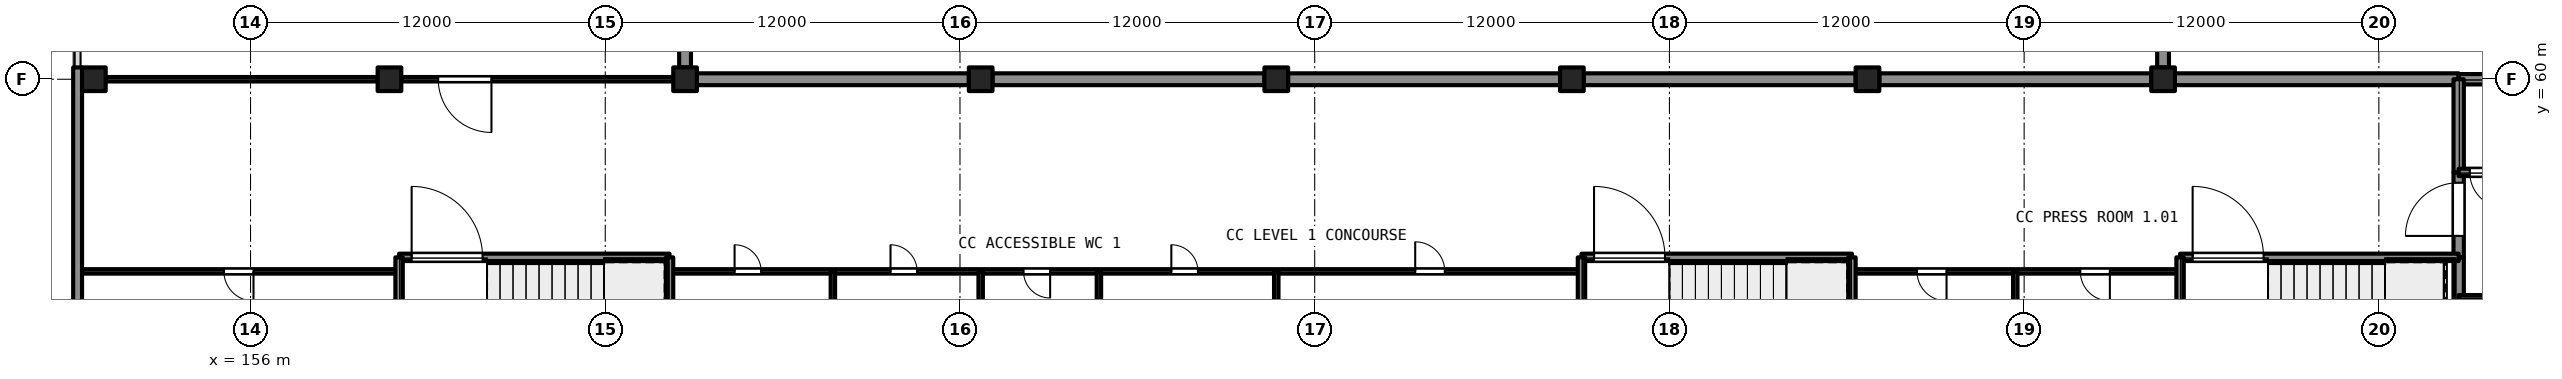
"""IFC4 building model, lengths in metres.
Left out: names, types, materials, properties, quantities, classifications, styles, units other than length and angle.
Written with IfcOpenShell. Run it as: python <this file> out.ifc"""

import sys

from ifc_helpers import new_model, si_unit, direction, frame, frame_2d, origin, origin_2d, place, context, subcontext, project, spatial, rectangle, extrude, element, fill, save


model = new_model("IFC4")
c1 = context("Model", 3, precision=1e-05, world=origin(), true_north=direction((0.0, 1.0)))
c2 = subcontext(c1, "Body", "Model", "MODEL_VIEW")
j1 = project(units=[si_unit("LENGTHUNIT", "METRE"), si_unit("PLANEANGLEUNIT", "RADIAN")], contexts=[c1])
p1 = place(None, origin())
s1 = spatial("IfcSite", under=j1, at=p1, CompositionType="ELEMENT")
p2 = place(p1, origin())
s2 = spatial("IfcBuilding", under=s1, at=p2, CompositionType="ELEMENT")
p3 = place(p2, frame((0.0, 0.0, 9.0)))
s3 = spatial("IfcBuildingStorey", under=s2, at=p3, CompositionType="ELEMENT", Elevation=9.0)
for number, where, z_axis, x_axis in (
    (1, (150.7, 60.0, 0.0), (0.0, 0.0, 1.0), (1.0, 0.0, 0.0)),
    (2, (160.7, 60.0, 0.0), (0.0, 0.0, 1.0), (1.0, 0.0, 0.0)),
    (3, (170.7, 60.0, 0.0), (0.0, 0.0, 1.0), (1.0, 0.0, 0.0)),
    (4, (180.7, 60.0, 0.0), (0.0, 0.0, 1.0), (1.0, 0.0, 0.0)),
    (5, (190.7, 60.0, 0.0), (0.0, 0.0, 1.0), (1.0, 0.0, 0.0)),
    (6, (200.7, 60.0, 0.0), (0.0, 0.0, 1.0), (1.0, 0.0, 0.0)),
    (7, (210.7, 60.0, 0.0), (0.0, 0.0, 1.0), (1.0, 0.0, 0.0)),
    (8, (220.7, 60.0, 0.0), (0.0, 0.0, 1.0), (1.0, 0.0, 0.0)),
):
    element("IfcColumn", number, at=place(p3, frame(where, z_axis=z_axis, x_axis=x_axis)), inside=s3, PredefinedType="COLUMN", context=c2, shape_type="SweptSolid", body=[
        extrude(rectangle(XDim=0.8, YDim=0.8, at=origin_2d()), origin(), (0.0, 0.0, 1.0), 6.0),
    ])
p4 = place(p3, frame((170.7, 60.4, 0.0), z_axis=(0.0, 0.0, 1.0), x_axis=(0.0, 1.0, 0.0)))
e9 = element("IfcWall", 9, at=p4, inside=s3, PredefinedType="SHEAR", context=c2, shape_type="SweptSolid", body=[
    extrude(rectangle(XDim=39.6, YDim=0.4, at=frame_2d((19.8, 0.0))), origin(), (0.0, 0.0, 1.0), 5.59),
])
for number, where, z_axis, x_axis in (
    (10, (171.1, 60.0, 0.0), (0.0, 0.0, 1.0), (1.0, 0.0, 0.0)),
    (11, (181.1, 60.0, 0.0), (0.0, 0.0, 1.0), (1.0, 0.0, 0.0)),
    (12, (191.1, 60.0, 0.0), (0.0, 0.0, 1.0), (1.0, 0.0, 0.0)),
    (13, (201.1, 60.0, 0.0), (0.0, 0.0, 1.0), (1.0, 0.0, 0.0)),
    (14, (211.1, 60.0, 0.0), (0.0, 0.0, 1.0), (1.0, 0.0, 0.0)),
):
    element("IfcWall", number, at=place(p3, frame(where, z_axis=z_axis, x_axis=x_axis)), inside=s3, PredefinedType="SHEAR", context=c2, shape_type="SweptSolid", body=[
        extrude(rectangle(XDim=9.2, YDim=0.4, at=frame_2d((4.6, 0.0))), origin(), (0.0, 0.0, 1.0), 5.59),
    ])
p5 = place(p3, frame((220.7, 60.4, 0.0), z_axis=(0.0, 0.0, 1.0), x_axis=(0.0, 1.0, 0.0)))
e15 = element("IfcWall", 15, at=p5, inside=s3, PredefinedType="SHEAR", context=c2, shape_type="SweptSolid", body=[
    extrude(rectangle(XDim=9.2, YDim=0.4, at=frame_2d((4.6, 0.0))), origin(), (0.0, 0.0, 1.0), 6.0),
])
p6 = place(p3, frame((221.1, 60.0, 0.0), z_axis=(0.0, 0.0, 1.0), x_axis=(1.0, 0.0, 0.0)))
e16 = element("IfcWall", 16, at=p6, inside=s3, PredefinedType="SHEAR", context=c2, shape_type="SweptSolid", body=[
    extrude(rectangle(XDim=9.6, YDim=0.4, at=frame_2d((4.8, 0.0))), origin(), (0.0, 0.0, 1.0), 6.0),
])
p7 = place(p3, frame((230.7, 60.0, 0.0), z_axis=(0.0, 0.0, 1.0), x_axis=(1.0, 0.0, 0.0)))
e17 = element("IfcWall", 17, at=p7, inside=s3, PredefinedType="SHEAR", context=c2, shape_type="SweptSolid", body=[
    extrude(rectangle(XDim=7.7, YDim=0.35, at=frame_2d((3.85, 0.0))), origin(), (0.0, 0.0, 1.0), 5.59),
])
p8 = place(p3, frame((230.7, 49.6, 0.0), z_axis=(0.0, 0.0, 1.0), x_axis=(0.0, 1.0, 0.0)))
e18 = element("IfcWall", 18, at=p8, inside=s3, PredefinedType="SHEAR", context=c2, shape_type="SweptSolid", body=[
    extrude(rectangle(XDim=4.375, YDim=0.35, at=frame_2d((2.188, 0.0))), origin(), (0.0, 0.0, 1.0), 5.59),
])
p9 = place(p3, frame((230.7, 53.975, 0.0), z_axis=(0.0, 0.0, 1.0), x_axis=(0.0, 1.0, 0.0)))
e19 = element("IfcWall", 19, at=p9, inside=s3, PredefinedType="SHEAR", context=c2, shape_type="SweptSolid", body=[
    extrude(rectangle(XDim=2.875, YDim=0.35, at=frame_2d((1.438, 0.0))), origin(), (0.0, 0.0, 1.0), 5.59),
])
p10 = place(p9, frame((0.725, 0.0, 0.0)))
e20 = element("IfcOpeningElement", 20, at=p10, cuts=e19, PredefinedType="OPENING", context=c2, shape_type="SweptSolid", body=[
    extrude(rectangle(XDim=1.8, YDim=2.1, at=frame_2d((0.9, 1.05))), frame((0.0, 0.186, 0.0), z_axis=(0.0, -1.0, 0.0), x_axis=(1.0, 0.0, 0.0)), (0.0, 0.0, 1.0), 0.371),
])
p11 = place(p3, frame((230.7, 56.85, 0.0), z_axis=(0.0, 0.0, 1.0), x_axis=(0.0, 1.0, 0.0)))
e21 = element("IfcWall", 21, at=p11, inside=s3, PredefinedType="SHEAR", context=c2, shape_type="SweptSolid", body=[
    extrude(rectangle(XDim=3.15, YDim=0.35, at=frame_2d((1.575, 0.0))), origin(), (0.0, 0.0, 1.0), 5.59),
])
p12 = place(p3, frame((238.4, 56.85, 0.0), z_axis=(0.0, 0.0, 1.0), x_axis=(-1.0, 0.0, 0.0)))
e22 = element("IfcWall", 22, at=p12, inside=s3, PredefinedType="SHEAR", context=c2, shape_type="SweptSolid", body=[
    extrude(rectangle(XDim=7.7, YDim=0.25, at=frame_2d((3.85, 0.0))), origin(), (0.0, 0.0, 1.0), 5.59),
])
p13 = place(p12, frame((6.125, 0.0, 0.0)))
e23 = element("IfcOpeningElement", 23, at=p13, cuts=e22, PredefinedType="OPENING", context=c2, shape_type="SweptSolid", body=[
    extrude(rectangle(XDim=1.2, YDim=2.1, at=frame_2d((0.6, 1.05))), frame((0.0, 0.135, 0.0), z_axis=(0.0, -1.0, 0.0), x_axis=(1.0, 0.0, 0.0)), (0.0, 0.0, 1.0), 0.271),
])
p14 = place(p3, frame((237.525, 52.625, 0.0), z_axis=(0.0, 0.0, 1.0), x_axis=(-1.0, 0.0, 0.0)))
e24 = element("IfcWall", 24, at=p14, inside=s3, PredefinedType="PARTITIONING", context=c2, shape_type="SweptSolid", body=[
    extrude(rectangle(XDim=6.825, YDim=0.15, at=frame_2d((3.413, 0.0))), origin(), (0.0, 0.0, 1.0), 5.59),
])
p15 = place(p14, frame((2.975, 0.0, 0.0)))
e25 = element("IfcOpeningElement", 25, at=p15, cuts=e24, PredefinedType="OPENING", context=c2, shape_type="SweptSolid", body=[
    extrude(rectangle(XDim=0.9, YDim=2.1, at=frame_2d((0.45, 1.05))), frame((0.0, 0.085, 0.0), z_axis=(0.0, -1.0, 0.0), x_axis=(1.0, 0.0, 0.0)), (0.0, 0.0, 1.0), 0.171),
])
p16 = place(p3, frame((150.15, 49.45, 0.0), z_axis=(0.0, 0.0, 1.0), x_axis=(0.0, 1.0, 0.0)))
e26 = element("IfcWall", 26, at=p16, inside=s3, PredefinedType="SOLIDWALL", context=c2, shape_type="SweptSolid", body=[
    extrude(rectangle(XDim=10.95, YDim=0.3, at=frame_2d((5.475, 0.0))), origin(), (0.0, 0.0, 1.0), 5.59),
])
p17 = place(p3, frame((151.1, 60.0, 0.0), z_axis=(0.0, 0.0, 1.0), x_axis=(1.0, 0.0, 0.0)))
e27 = element("IfcWall", 27, at=p17, inside=s3, PredefinedType="PARTITIONING", context=c2, shape_type="SweptSolid", body=[
    extrude(rectangle(XDim=9.2, YDim=0.15, at=frame_2d((4.6, 0.0))), origin(), (0.0, 0.0, 1.0), 5.59),
])
p18 = place(p3, frame((170.3, 60.0, 0.0), z_axis=(0.0, 0.0, 1.0), x_axis=(-1.0, 0.0, 0.0)))
e28 = element("IfcWall", 28, at=p18, inside=s3, PredefinedType="PARTITIONING", context=c2, shape_type="SweptSolid", body=[
    extrude(rectangle(XDim=9.2, YDim=0.15, at=frame_2d((4.6, 0.0))), origin(), (0.0, 0.0, 1.0), 5.59),
])
p19 = place(p18, frame((6.15, 0.0, 0.0)))
e29 = element("IfcOpeningElement", 29, at=p19, cuts=e28, PredefinedType="OPENING", context=c2, shape_type="SweptSolid", body=[
    extrude(rectangle(XDim=1.8, YDim=2.1, at=frame_2d((0.9, 1.05))), frame((0.0, 0.085, 0.0), z_axis=(0.0, -1.0, 0.0), x_axis=(1.0, 0.0, 0.0)), (0.0, 0.0, 1.0), 0.171),
])
p20 = place(p3, frame((150.3, 53.5, 0.0), z_axis=(0.0, 0.0, 1.0), x_axis=(1.0, 0.0, 0.0)))
e30 = element("IfcWall", 30, at=p20, inside=s3, PredefinedType="PARTITIONING", context=c2, shape_type="SweptSolid", body=[
    extrude(rectangle(XDim=10.725, YDim=0.15, at=frame_2d((5.362, 0.0))), origin(), (0.0, 0.0, 1.0), 5.59),
])
p21 = place(p20, frame((4.8, 0.0, 0.0)))
e31 = element("IfcOpeningElement", 31, at=p21, cuts=e30, PredefinedType="OPENING", context=c2, shape_type="SweptSolid", body=[
    extrude(rectangle(XDim=1.0, YDim=2.1, at=frame_2d((0.5, 1.05))), frame((0.0, 0.085, 0.0), z_axis=(0.0, -1.0, 0.0), x_axis=(1.0, 0.0, 0.0)), (0.0, 0.0, 1.0), 0.171),
])
p22 = place(p3, frame((170.175, 53.5, 0.0), z_axis=(0.0, 0.0, 1.0), x_axis=(1.0, 0.0, 0.0)))
e32 = element("IfcWall", 32, at=p22, inside=s3, PredefinedType="PARTITIONING", context=c2, shape_type="SweptSolid", body=[
    extrude(rectangle(XDim=30.85, YDim=0.15, at=frame_2d((15.425, 0.0))), origin(), (0.0, 0.0, 1.0), 5.59),
])
p23 = place(p22, frame((11.975, 0.0, 0.0)))
e33 = element("IfcOpeningElement", 33, at=p23, cuts=e32, PredefinedType="OPENING", context=c2, shape_type="SweptSolid", body=[
    extrude(rectangle(XDim=0.9, YDim=2.1, at=frame_2d((0.45, 1.05))), frame((0.0, 0.085, 0.0), z_axis=(0.0, -1.0, 0.0), x_axis=(1.0, 0.0, 0.0)), (0.0, 0.0, 1.0), 0.171),
])
p24 = place(p22, frame((16.975, 0.0, 0.0)))
e34 = element("IfcOpeningElement", 34, at=p24, cuts=e32, PredefinedType="OPENING", context=c2, shape_type="SweptSolid", body=[
    extrude(rectangle(XDim=0.9, YDim=2.1, at=frame_2d((0.45, 1.05))), frame((0.0, 0.085, 0.0), z_axis=(0.0, -1.0, 0.0), x_axis=(1.0, 0.0, 0.0)), (0.0, 0.0, 1.0), 0.171),
])
p25 = place(p22, frame((25.225, 0.0, 0.0)))
e35 = element("IfcOpeningElement", 35, at=p25, cuts=e32, PredefinedType="OPENING", context=c2, shape_type="SweptSolid", body=[
    extrude(rectangle(XDim=1.0, YDim=2.1, at=frame_2d((0.5, 1.05))), frame((0.0, 0.085, 0.0), z_axis=(0.0, -1.0, 0.0), x_axis=(1.0, 0.0, 0.0)), (0.0, 0.0, 1.0), 0.171),
])
p26 = place(p22, frame((7.475, 0.0, 0.0)))
e36 = element("IfcOpeningElement", 36, at=p26, cuts=e32, PredefinedType="OPENING", context=c2, shape_type="SweptSolid", body=[
    extrude(rectangle(XDim=0.9, YDim=2.1, at=frame_2d((0.45, 1.05))), frame((0.0, 0.085, 0.0), z_axis=(0.0, -1.0, 0.0), x_axis=(1.0, 0.0, 0.0)), (0.0, 0.0, 1.0), 0.171),
])
p27 = place(p22, frame((2.2, 0.0, 0.0)))
e37 = element("IfcOpeningElement", 37, at=p27, cuts=e32, PredefinedType="OPENING", context=c2, shape_type="SweptSolid", body=[
    extrude(rectangle(XDim=0.9, YDim=2.1, at=frame_2d((0.45, 1.05))), frame((0.0, 0.085, 0.0), z_axis=(0.0, -1.0, 0.0), x_axis=(1.0, 0.0, 0.0)), (0.0, 0.0, 1.0), 0.171),
])
p28 = place(p3, frame((210.175, 53.5, 0.0), z_axis=(0.0, 0.0, 1.0), x_axis=(1.0, 0.0, 0.0)))
e38 = element("IfcWall", 38, at=p28, inside=s3, PredefinedType="PARTITIONING", context=c2, shape_type="SweptSolid", body=[
    extrude(rectangle(XDim=11.1, YDim=0.15, at=frame_2d((5.55, 0.0))), origin(), (0.0, 0.0, 1.0), 5.59),
])
p29 = place(p28, frame((2.2, 0.0, 0.0)))
e39 = element("IfcOpeningElement", 39, at=p29, cuts=e38, PredefinedType="OPENING", context=c2, shape_type="SweptSolid", body=[
    extrude(rectangle(XDim=1.0, YDim=2.1, at=frame_2d((0.5, 1.05))), frame((0.0, 0.085, 0.0), z_axis=(0.0, -1.0, 0.0), x_axis=(1.0, 0.0, 0.0)), (0.0, 0.0, 1.0), 0.171),
])
p30 = place(p28, frame((7.725, 0.0, 0.0)))
e40 = element("IfcOpeningElement", 40, at=p30, cuts=e38, PredefinedType="OPENING", context=c2, shape_type="SweptSolid", body=[
    extrude(rectangle(XDim=1.0, YDim=2.1, at=frame_2d((0.5, 1.05))), frame((0.0, 0.085, 0.0), z_axis=(0.0, -1.0, 0.0), x_axis=(1.0, 0.0, 0.0)), (0.0, 0.0, 1.0), 0.171),
])
p31 = place(p3, frame((161.025, 53.975, 0.0), z_axis=(0.0, 0.0, 1.0), x_axis=(1.0, 0.0, 0.0)))
e41 = element("IfcWall", 41, at=p31, inside=s3, PredefinedType="SHEAR", context=c2, shape_type="SweptSolid", body=[
    extrude(rectangle(XDim=9.15, YDim=0.25, at=frame_2d((4.575, 0.0))), origin(), (0.0, 0.0, 1.0), 5.59),
])
p32 = place(p31, frame((0.425, 0.0, 0.0)))
e42 = element("IfcOpeningElement", 42, at=p32, cuts=e41, PredefinedType="OPENING", context=c2, shape_type="SweptSolid", body=[
    extrude(rectangle(XDim=2.4, YDim=2.1, at=frame_2d((1.2, 1.05))), frame((0.0, 0.135, 0.0), z_axis=(0.0, -1.0, 0.0), x_axis=(1.0, 0.0, 0.0)), (0.0, 0.0, 1.0), 0.271),
])
p33 = place(p3, frame((161.025, 50.4, 0.0), z_axis=(0.0, 0.0, 1.0), x_axis=(0.0, 1.0, 0.0)))
e43 = element("IfcWall", 43, at=p33, inside=s3, PredefinedType="SHEAR", context=c2, shape_type="SweptSolid", body=[
    extrude(rectangle(XDim=3.575, YDim=0.25, at=frame_2d((1.788, 0.0))), origin(), (0.0, 0.0, 1.0), 5.59),
])
p34 = place(p3, frame((170.175, 49.6, 0.0), z_axis=(0.0, 0.0, 1.0), x_axis=(0.0, 1.0, 0.0)))
e44 = element("IfcWall", 44, at=p34, inside=s3, PredefinedType="SHEAR", context=c2, shape_type="SweptSolid", body=[
    extrude(rectangle(XDim=4.375, YDim=0.25, at=frame_2d((2.188, 0.0))), origin(), (0.0, 0.0, 1.0), 5.59),
])
p35 = place(p3, frame((201.025, 53.975, 0.0), z_axis=(0.0, 0.0, 1.0), x_axis=(1.0, 0.0, 0.0)))
e45 = element("IfcWall", 45, at=p35, inside=s3, PredefinedType="SHEAR", context=c2, shape_type="SweptSolid", body=[
    extrude(rectangle(XDim=9.15, YDim=0.25, at=frame_2d((4.575, 0.0))), origin(), (0.0, 0.0, 1.0), 5.59),
])
p36 = place(p35, frame((0.425, 0.0, 0.0)))
e46 = element("IfcOpeningElement", 46, at=p36, cuts=e45, PredefinedType="OPENING", context=c2, shape_type="SweptSolid", body=[
    extrude(rectangle(XDim=2.4, YDim=2.1, at=frame_2d((1.2, 1.05))), frame((0.0, 0.135, 0.0), z_axis=(0.0, -1.0, 0.0), x_axis=(1.0, 0.0, 0.0)), (0.0, 0.0, 1.0), 0.271),
])
p37 = place(p3, frame((201.025, 50.4, 0.0), z_axis=(0.0, 0.0, 1.0), x_axis=(0.0, 1.0, 0.0)))
e47 = element("IfcWall", 47, at=p37, inside=s3, PredefinedType="SHEAR", context=c2, shape_type="SweptSolid", body=[
    extrude(rectangle(XDim=3.575, YDim=0.25, at=frame_2d((1.788, 0.0))), origin(), (0.0, 0.0, 1.0), 5.59),
])
p38 = place(p3, frame((210.175, 49.6, 0.0), z_axis=(0.0, 0.0, 1.0), x_axis=(0.0, 1.0, 0.0)))
e48 = element("IfcWall", 48, at=p38, inside=s3, PredefinedType="SHEAR", context=c2, shape_type="SweptSolid", body=[
    extrude(rectangle(XDim=4.375, YDim=0.25, at=frame_2d((2.188, 0.0))), origin(), (0.0, 0.0, 1.0), 5.59),
])
p39 = place(p3, frame((221.275, 53.975, 0.0), z_axis=(0.0, 0.0, 1.0), x_axis=(1.0, 0.0, 0.0)))
e49 = element("IfcWall", 49, at=p39, inside=s3, PredefinedType="SHEAR", context=c2, shape_type="SweptSolid", body=[
    extrude(rectangle(XDim=9.425, YDim=0.25, at=frame_2d((4.712, 0.0))), origin(), (0.0, 0.0, 1.0), 5.59),
])
p40 = place(p39, frame((0.425, 0.0, 0.0)))
e50 = element("IfcOpeningElement", 50, at=p40, cuts=e49, PredefinedType="OPENING", context=c2, shape_type="SweptSolid", body=[
    extrude(rectangle(XDim=2.4, YDim=2.1, at=frame_2d((1.2, 1.05))), frame((0.0, 0.135, 0.0), z_axis=(0.0, -1.0, 0.0), x_axis=(1.0, 0.0, 0.0)), (0.0, 0.0, 1.0), 0.271),
])
p41 = place(p3, frame((221.275, 49.6, 0.0), z_axis=(0.0, 0.0, 1.0), x_axis=(0.0, 1.0, 0.0)))
e51 = element("IfcWall", 51, at=p41, inside=s3, PredefinedType="SHEAR", context=c2, shape_type="SweptSolid", body=[
    extrude(rectangle(XDim=4.375, YDim=0.25, at=frame_2d((2.188, 0.0))), origin(), (0.0, 0.0, 1.0), 5.59),
])
p42 = place(p3, frame((175.7, 49.6, 0.0), z_axis=(0.0, 0.0, 1.0), x_axis=(0.0, 1.0, 0.0)))
e52 = element("IfcWall", 52, at=p42, inside=s3, PredefinedType="PARTITIONING", context=c2, shape_type="SweptSolid", body=[
    extrude(rectangle(XDim=3.9, YDim=0.15, at=frame_2d((1.95, 0.0))), origin(), (0.0, 0.0, 1.0), 5.59),
])
p43 = place(p3, frame((180.7, 50.4, 0.0), z_axis=(0.0, 0.0, 1.0), x_axis=(0.0, 1.0, 0.0)))
e53 = element("IfcWall", 53, at=p43, inside=s3, PredefinedType="PARTITIONING", context=c2, shape_type="SweptSolid", body=[
    extrude(rectangle(XDim=3.1, YDim=0.15, at=frame_2d((1.55, 0.0))), origin(), (0.0, 0.0, 1.0), 5.59),
])
p44 = place(p3, frame((184.7, 49.6, 0.0), z_axis=(0.0, 0.0, 1.0), x_axis=(0.0, 1.0, 0.0)))
e54 = element("IfcWall", 54, at=p44, inside=s3, PredefinedType="PARTITIONING", context=c2, shape_type="SweptSolid", body=[
    extrude(rectangle(XDim=3.9, YDim=0.15, at=frame_2d((1.95, 0.0))), origin(), (0.0, 0.0, 1.0), 5.59),
])
p45 = place(p3, frame((190.7, 50.4, 0.0), z_axis=(0.0, 0.0, 1.0), x_axis=(0.0, 1.0, 0.0)))
e55 = element("IfcWall", 55, at=p45, inside=s3, PredefinedType="PARTITIONING", context=c2, shape_type="SweptSolid", body=[
    extrude(rectangle(XDim=3.1, YDim=0.15, at=frame_2d((1.55, 0.0))), origin(), (0.0, 0.0, 1.0), 5.59),
])
p46 = place(p3, frame((215.7, 49.6, 0.0), z_axis=(0.0, 0.0, 1.0), x_axis=(0.0, 1.0, 0.0)))
e56 = element("IfcWall", 56, at=p46, inside=s3, PredefinedType="PARTITIONING", context=c2, shape_type="SweptSolid", body=[
    extrude(rectangle(XDim=3.9, YDim=0.15, at=frame_2d((1.95, 0.0))), origin(), (0.0, 0.0, 1.0), 5.59),
])
p47 = place(p23, origin())
e57 = element("IfcDoor", 57, at=p47, inside=s3, OperationType="SINGLE_SWING_RIGHT", PredefinedType="DOOR", context=c2, shape_type="SweptSolid", body=[
    extrude(rectangle(XDim=0.9, YDim=2.1, at=frame_2d((0.45, 1.05))), frame((0.0, 0.025, 0.0), z_axis=(0.0, -1.0, 0.0), x_axis=(1.0, 0.0, 0.0)), (0.0, 0.0, 1.0), 0.05),
])
fill(e33, e57)
p48 = place(p24, origin())
e58 = element("IfcDoor", 58, at=p48, inside=s3, OperationType="SINGLE_SWING_LEFT", PredefinedType="DOOR", context=c2, shape_type="SweptSolid", body=[
    extrude(rectangle(XDim=0.9, YDim=2.1, at=frame_2d((0.45, 1.05))), frame((0.0, 0.025, 0.0), z_axis=(0.0, -1.0, 0.0), x_axis=(1.0, 0.0, 0.0)), (0.0, 0.0, 1.0), 0.05),
])
fill(e34, e58)
p49 = place(p21, origin())
e59 = element("IfcDoor", 59, at=p49, inside=s3, OperationType="SINGLE_SWING_RIGHT", PredefinedType="DOOR", context=c2, shape_type="SweptSolid", body=[
    extrude(rectangle(XDim=1.0, YDim=2.1, at=frame_2d((0.5, 1.05))), frame((0.0, 0.025, 0.0), z_axis=(0.0, -1.0, 0.0), x_axis=(1.0, 0.0, 0.0)), (0.0, 0.0, 1.0), 0.05),
])
fill(e31, e59)
p50 = place(p25, origin())
e60 = element("IfcDoor", 60, at=p50, inside=s3, OperationType="SINGLE_SWING_LEFT", PredefinedType="DOOR", context=c2, shape_type="SweptSolid", body=[
    extrude(rectangle(XDim=1.0, YDim=2.1, at=frame_2d((0.5, 1.05))), frame((0.0, 0.025, 0.0), z_axis=(0.0, -1.0, 0.0), x_axis=(1.0, 0.0, 0.0)), (0.0, 0.0, 1.0), 0.05),
])
fill(e35, e60)
p51 = place(p29, origin())
e61 = element("IfcDoor", 61, at=p51, inside=s3, OperationType="SINGLE_SWING_RIGHT", PredefinedType="DOOR", context=c2, shape_type="SweptSolid", body=[
    extrude(rectangle(XDim=1.0, YDim=2.1, at=frame_2d((0.5, 1.05))), frame((0.0, 0.025, 0.0), z_axis=(0.0, -1.0, 0.0), x_axis=(1.0, 0.0, 0.0)), (0.0, 0.0, 1.0), 0.05),
])
fill(e39, e61)
p52 = place(p26, origin())
e62 = element("IfcDoor", 62, at=p52, inside=s3, OperationType="SINGLE_SWING_LEFT", PredefinedType="DOOR", context=c2, shape_type="SweptSolid", body=[
    extrude(rectangle(XDim=0.9, YDim=2.1, at=frame_2d((0.45, 1.05))), frame((0.0, 0.025, 0.0), z_axis=(0.0, -1.0, 0.0), x_axis=(1.0, 0.0, 0.0)), (0.0, 0.0, 1.0), 0.05),
])
fill(e36, e62)
p53 = place(p30, origin())
e63 = element("IfcDoor", 63, at=p53, inside=s3, OperationType="SINGLE_SWING_RIGHT", PredefinedType="DOOR", context=c2, shape_type="SweptSolid", body=[
    extrude(rectangle(XDim=1.0, YDim=2.1, at=frame_2d((0.5, 1.05))), frame((0.0, 0.025, 0.0), z_axis=(0.0, -1.0, 0.0), x_axis=(1.0, 0.0, 0.0)), (0.0, 0.0, 1.0), 0.05),
])
fill(e40, e63)
p54 = place(p27, origin())
e64 = element("IfcDoor", 64, at=p54, inside=s3, OperationType="SINGLE_SWING_LEFT", PredefinedType="DOOR", context=c2, shape_type="SweptSolid", body=[
    extrude(rectangle(XDim=0.9, YDim=2.1, at=frame_2d((0.45, 1.05))), frame((0.0, 0.025, 0.0), z_axis=(0.0, -1.0, 0.0), x_axis=(1.0, 0.0, 0.0)), (0.0, 0.0, 1.0), 0.05),
])
fill(e37, e64)
p55 = place(p19, origin())
e65 = element("IfcDoor", 65, at=p55, inside=s3, OperationType="DOUBLE_DOOR_SINGLE_SWING", PredefinedType="DOOR", context=c2, shape_type="SweptSolid", body=[
    extrude(rectangle(XDim=1.8, YDim=2.1, at=frame_2d((0.9, 1.05))), frame((0.0, 0.025, 0.0), z_axis=(0.0, -1.0, 0.0), x_axis=(1.0, 0.0, 0.0)), (0.0, 0.0, 1.0), 0.05),
])
fill(e29, e65)
p56 = place(p10, origin())
e66 = element("IfcDoor", 66, at=p56, inside=s3, OperationType="DOUBLE_DOOR_SINGLE_SWING", PredefinedType="DOOR", context=c2, shape_type="SweptSolid", body=[
    extrude(rectangle(XDim=1.8, YDim=2.1, at=frame_2d((0.9, 1.05))), frame((0.0, 0.025, 0.0), z_axis=(0.0, -1.0, 0.0), x_axis=(1.0, 0.0, 0.0)), (0.0, 0.0, 1.0), 0.05),
])
fill(e20, e66)
p57 = place(p13, origin())
e67 = element("IfcDoor", 67, at=p57, inside=s3, OperationType="SINGLE_SWING_LEFT", PredefinedType="DOOR", context=c2, shape_type="SweptSolid", body=[
    extrude(rectangle(XDim=1.2, YDim=2.1, at=frame_2d((0.6, 1.05))), frame((0.0, 0.025, 0.0), z_axis=(0.0, -1.0, 0.0), x_axis=(1.0, 0.0, 0.0)), (0.0, 0.0, 1.0), 0.05),
])
fill(e23, e67)
p58 = place(p32, origin())
e68 = element("IfcDoor", 68, at=p58, inside=s3, OperationType="DOUBLE_DOOR_SINGLE_SWING", PredefinedType="DOOR", context=c2, shape_type="SweptSolid", body=[
    extrude(rectangle(XDim=2.4, YDim=2.1, at=frame_2d((1.2, 1.05))), frame((0.0, 0.025, 0.0), z_axis=(0.0, -1.0, 0.0), x_axis=(1.0, 0.0, 0.0)), (0.0, 0.0, 1.0), 0.05),
])
fill(e42, e68)
p59 = place(p36, origin())
e69 = element("IfcDoor", 69, at=p59, inside=s3, OperationType="DOUBLE_DOOR_SINGLE_SWING", PredefinedType="DOOR", context=c2, shape_type="SweptSolid", body=[
    extrude(rectangle(XDim=2.4, YDim=2.1, at=frame_2d((1.2, 1.05))), frame((0.0, 0.025, 0.0), z_axis=(0.0, -1.0, 0.0), x_axis=(1.0, 0.0, 0.0)), (0.0, 0.0, 1.0), 0.05),
])
fill(e46, e69)
p60 = place(p40, origin())
e70 = element("IfcDoor", 70, at=p60, inside=s3, OperationType="DOUBLE_DOOR_SINGLE_SWING", PredefinedType="DOOR", context=c2, shape_type="SweptSolid", body=[
    extrude(rectangle(XDim=2.4, YDim=2.1, at=frame_2d((1.2, 1.05))), frame((0.0, 0.025, 0.0), z_axis=(0.0, -1.0, 0.0), x_axis=(1.0, 0.0, 0.0)), (0.0, 0.0, 1.0), 0.05),
])
fill(e50, e70)
save(model, sys.argv[1])
